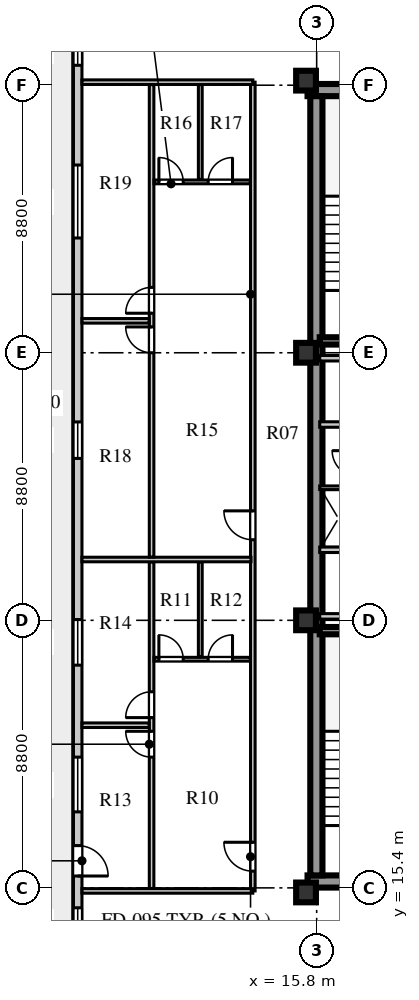
"""IFC4 building model, lengths in metres.
Left out: names, types, materials, properties, quantities, classifications, styles, units other than length and angle.
Written with IfcOpenShell. Run it as: python <this file> out.ifc"""

import sys

from ifc_helpers import new_model, si_unit, direction, frame, frame_2d, origin, origin_2d, place, context, subcontext, project, spatial, rectangle, extrude, element, fill, save


model = new_model("IFC4")
c1 = context("Model", 3, precision=1e-05, world=origin(), true_north=direction((0.0, 1.0)))
c2 = subcontext(c1, "Body", "Model", "MODEL_VIEW")
j1 = project(units=[si_unit("LENGTHUNIT", "METRE"), si_unit("PLANEANGLEUNIT", "RADIAN")], contexts=[c1])
p1 = place(None, origin())
s1 = spatial("IfcSite", under=j1, at=p1, CompositionType="ELEMENT")
p2 = place(p1, origin())
s2 = spatial("IfcBuilding", under=s1, at=p2, CompositionType="ELEMENT")
p3 = place(p2, frame((0.0, 0.0, 245.3)))
s3 = spatial("IfcBuildingStorey", under=s2, at=p3, CompositionType="ELEMENT", Elevation=245.3)
for number, where, z_axis, x_axis in (
    (1, (15.5, 15.61, 0.0), (0.0, 0.0, 1.0), (1.0, 0.0, 0.0)),
    (2, (15.5, 41.64, 0.0), (0.0, 0.0, 1.0), (1.0, 0.0, 0.0)),
):
    element("IfcWall", number, at=place(p3, frame(where, z_axis=z_axis, x_axis=x_axis)), inside=s3, PredefinedType="SHEAR", context=c2, shape_type="SweptSolid", body=[
        extrude(rectangle(XDim=9.48, YDim=0.4, at=frame_2d((4.74, 0.0))), origin(), (0.0, 0.0, 1.0), 3.66),
    ])
p4 = place(p3, frame((15.79, 15.81, 0.0), z_axis=(0.0, 0.0, 1.0), x_axis=(0.0, 1.0, 0.0)))
e3 = element("IfcWall", 3, at=p4, inside=s3, PredefinedType="SHEAR", context=c2, shape_type="SweptSolid", body=[
    extrude(rectangle(XDim=25.63, YDim=0.4, at=frame_2d((12.815, 0.0))), origin(), (0.0, 0.0, 1.0), 3.66),
])
for number, where, z_axis, x_axis in (
    (4, (15.45, 15.25, 0.0), (0.0, 0.0, 1.0), (1.0, 0.0, 0.0)),
    (5, (15.45, 24.2, 0.0), (0.0, 0.0, 1.0), (1.0, 0.0, 0.0)),
    (6, (15.45, 33.0, 0.0), (0.0, 0.0, 1.0), (1.0, 0.0, 0.0)),
    (7, (15.45, 41.95, 0.0), (0.0, 0.0, 1.0), (1.0, 0.0, 0.0)),
):
    element("IfcColumn", number, at=place(p3, frame(where, z_axis=z_axis, x_axis=x_axis)), inside=s3, PredefinedType="COLUMN", context=c2, shape_type="SweptSolid", body=[
        extrude(rectangle(XDim=0.65, YDim=0.65, at=origin_2d()), origin(), (0.0, 0.0, 1.0), 3.66),
    ])
p5 = place(p3, frame((7.94, 44.07, 0.0), z_axis=(0.0, 0.0, 1.0), x_axis=(0.0, -1.0, 0.0)))
e8 = element("IfcWall", 8, at=p5, inside=s3, PredefinedType="STANDARD", context=c2, shape_type="SweptSolid", body=[
    extrude(rectangle(XDim=30.94, YDim=0.28, at=frame_2d((15.47, 0.0))), origin(), (0.0, 0.0, 1.0), 3.66),
])
p6 = place(p5, frame((29.325, 0.0, 0.8)))
e9 = element("IfcOpeningElement", 9, at=p6, cuts=e8, PredefinedType="OPENING", context=c2, shape_type="SweptSolid", body=[
    extrude(rectangle(XDim=0.95, YDim=1.65, at=frame_2d((0.475, 0.825))), frame((0.0, 0.15, 0.0), z_axis=(0.0, -1.0, 0.0), x_axis=(1.0, 0.0, 0.0)), (0.0, 0.0, 1.0), 0.3),
])
p7 = place(p5, frame((27.28, 0.0, 0.0)))
e10 = element("IfcOpeningElement", 10, at=p7, cuts=e8, PredefinedType="OPENING", context=c2, shape_type="SweptSolid", body=[
    extrude(rectangle(XDim=1.0, YDim=2.05, at=frame_2d((0.5, 1.025))), frame((0.0, 0.15, 0.0), z_axis=(0.0, -1.0, 0.0), x_axis=(1.0, 0.0, 0.0)), (0.0, 0.0, 1.0), 0.3),
])
p8 = place(p5, frame((24.37, 0.0, 0.8)))
e11 = element("IfcOpeningElement", 11, at=p8, cuts=e8, PredefinedType="OPENING", context=c2, shape_type="SweptSolid", body=[
    extrude(rectangle(XDim=1.8, YDim=2.0, at=frame_2d((0.9, 1.0))), frame((0.0, 0.15, 0.0), z_axis=(0.0, -1.0, 0.0), x_axis=(1.0, 0.0, 0.0)), (0.0, 0.0, 1.0), 0.3),
])
p9 = place(p5, frame((19.845, 0.0, 0.8)))
e12 = element("IfcOpeningElement", 12, at=p9, cuts=e8, PredefinedType="OPENING", context=c2, shape_type="SweptSolid", body=[
    extrude(rectangle(XDim=1.5, YDim=2.0, at=frame_2d((0.75, 1.0))), frame((0.0, 0.15, 0.0), z_axis=(0.0, -1.0, 0.0), x_axis=(1.0, 0.0, 0.0)), (0.0, 0.0, 1.0), 0.3),
])
p10 = place(p5, frame((13.345, 0.0, 0.8)))
e13 = element("IfcOpeningElement", 13, at=p10, cuts=e8, PredefinedType="OPENING", context=c2, shape_type="SweptSolid", body=[
    extrude(rectangle(XDim=1.2, YDim=1.75, at=frame_2d((0.6, 0.875))), frame((0.0, 0.15, 0.0), z_axis=(0.0, -1.0, 0.0), x_axis=(1.0, 0.0, 0.0)), (0.0, 0.0, 1.0), 0.3),
])
p11 = place(p5, frame((4.895, 0.0, 0.8)))
e14 = element("IfcOpeningElement", 14, at=p11, cuts=e8, PredefinedType="OPENING", context=c2, shape_type="SweptSolid", body=[
    extrude(rectangle(XDim=2.4, YDim=2.05, at=frame_2d((1.2, 1.025))), frame((0.0, 0.15, 0.0), z_axis=(0.0, -1.0, 0.0), x_axis=(1.0, 0.0, 0.0)), (0.0, 0.0, 1.0), 0.3),
])
p12 = place(p5, frame((0.665, 0.0, 0.8)))
e15 = element("IfcOpeningElement", 15, at=p12, cuts=e8, PredefinedType="OPENING", context=c2, shape_type="SweptSolid", body=[
    extrude(rectangle(XDim=0.95, YDim=1.65, at=frame_2d((0.475, 0.825))), frame((0.0, 0.15, 0.0), z_axis=(0.0, -1.0, 0.0), x_axis=(1.0, 0.0, 0.0)), (0.0, 0.0, 1.0), 0.3),
])
p13 = place(p3, frame((15.9, 23.86, 0.0), z_axis=(0.0, 0.0, 1.0), x_axis=(1.0, 0.0, 0.0)))
e16 = element("IfcWall", 16, at=p13, inside=s3, PredefinedType="SHEAR", context=c2, shape_type="SweptSolid", body=[
    extrude(rectangle(XDim=3.52, YDim=0.24, at=frame_2d((1.76, 0.0))), origin(), (0.0, 0.0, 1.0), 3.9),
])
p14 = place(p3, frame((15.9, 26.52, 0.0), z_axis=(0.0, 0.0, 1.0), x_axis=(1.0, 0.0, 0.0)))
e17 = element("IfcWall", 17, at=p14, inside=s3, PredefinedType="SOLIDWALL", context=c2, shape_type="SweptSolid", body=[
    extrude(rectangle(XDim=8.68, YDim=0.18, at=frame_2d((4.34, 0.0))), origin(), (0.0, 0.0, 1.0), 3.66),
])
p15 = place(p14, frame((3.3, 0.0, 0.0)))
e18 = element("IfcOpeningElement", 18, at=p15, cuts=e17, PredefinedType="OPENING", context=c2, shape_type="SweptSolid", body=[
    extrude(rectangle(XDim=0.95, YDim=2.1, at=frame_2d((0.475, 1.05))), frame((0.0, 0.1, 0.0), z_axis=(0.0, -1.0, 0.0), x_axis=(1.0, 0.0, 0.0)), (0.0, 0.0, 1.0), 0.2),
])
p16 = place(p3, frame((15.9, 24.33, 0.0), z_axis=(0.0, 0.0, 1.0), x_axis=(1.0, 0.0, 0.0)))
e19 = element("IfcWall", 19, at=p16, inside=s3, PredefinedType="SOLIDWALL", context=c2, shape_type="SweptSolid", body=[
    extrude(rectangle(XDim=8.68, YDim=0.18, at=frame_2d((4.34, 0.0))), origin(), (0.0, 0.0, 1.0), 3.06),
])
p17 = place(p3, frame((15.9, 28.56, 0.0), z_axis=(0.0, 0.0, 1.0), x_axis=(1.0, 0.0, 0.0)))
e20 = element("IfcWall", 20, at=p17, inside=s3, PredefinedType="PARTITIONING", context=c2, shape_type="SweptSolid", body=[
    extrude(rectangle(XDim=1.2, YDim=0.12, at=frame_2d((0.6, 0.0))), origin(), (0.0, 0.0, 1.0), 3.66),
])
p18 = place(p3, frame((15.9, 30.64, 0.0), z_axis=(0.0, 0.0, 1.0), x_axis=(1.0, 0.0, 0.0)))
e21 = element("IfcWall", 21, at=p18, inside=s3, PredefinedType="SOLIDWALL", context=c2, shape_type="SweptSolid", body=[
    extrude(rectangle(XDim=8.68, YDim=0.18, at=frame_2d((4.34, 0.0))), origin(), (0.0, 0.0, 1.0), 3.66),
])
p19 = place(p18, frame((3.7, 0.0, 0.0)))
e22 = element("IfcOpeningElement", 22, at=p19, cuts=e21, PredefinedType="OPENING", context=c2, shape_type="SweptSolid", body=[
    extrude(rectangle(XDim=0.95, YDim=2.1, at=frame_2d((0.475, 1.05))), frame((0.0, 0.1, 0.0), z_axis=(0.0, -1.0, 0.0), x_axis=(1.0, 0.0, 0.0)), (0.0, 0.0, 1.0), 0.2),
])
p20 = place(p3, frame((15.9, 32.82, 0.0), z_axis=(0.0, 0.0, 1.0), x_axis=(1.0, 0.0, 0.0)))
e23 = element("IfcWall", 23, at=p20, inside=s3, PredefinedType="SOLIDWALL", context=c2, shape_type="SweptSolid", body=[
    extrude(rectangle(XDim=8.68, YDim=0.18, at=frame_2d((4.34, 0.0))), origin(), (0.0, 0.0, 1.0), 3.06),
])
p21 = place(p3, frame((15.9, 33.39, 0.0), z_axis=(0.0, 0.0, 1.0), x_axis=(1.0, 0.0, 0.0)))
e24 = element("IfcWall", 24, at=p21, inside=s3, PredefinedType="SHEAR", context=c2, shape_type="SweptSolid", body=[
    extrude(rectangle(XDim=3.52, YDim=0.24, at=frame_2d((1.76, 0.0))), origin(), (0.0, 0.0, 1.0), 3.9),
])
p22 = place(p3, frame((13.7, 15.3, 0.0), z_axis=(0.0, 0.0, 1.0), x_axis=(0.0, 1.0, 0.0)))
e25 = element("IfcWall", 25, at=p22, inside=s3, PredefinedType="PARTITIONING", context=c2, shape_type="SweptSolid", body=[
    extrude(rectangle(XDim=26.6, YDim=0.15, at=frame_2d((13.3, 0.0))), origin(), (0.0, 0.0, 1.0), 3.66),
])
p23 = place(p22, frame((0.65, 0.0, 0.0)))
e26 = element("IfcOpeningElement", 26, at=p23, cuts=e25, PredefinedType="OPENING", context=c2, shape_type="SweptSolid", body=[
    extrude(rectangle(XDim=0.95, YDim=2.1, at=frame_2d((0.475, 1.05))), frame((0.0, 0.085, 0.0), z_axis=(0.0, -1.0, 0.0), x_axis=(1.0, 0.0, 0.0)), (0.0, 0.0, 1.0), 0.17),
])
p24 = place(p22, frame((11.55, 0.0, 0.0)))
e27 = element("IfcOpeningElement", 27, at=p24, cuts=e25, PredefinedType="OPENING", context=c2, shape_type="SweptSolid", body=[
    extrude(rectangle(XDim=0.95, YDim=2.1, at=frame_2d((0.475, 1.05))), frame((0.0, 0.085, 0.0), z_axis=(0.0, -1.0, 0.0), x_axis=(1.0, 0.0, 0.0)), (0.0, 0.0, 1.0), 0.17),
])
for number, where, z_axis, x_axis in (
    (28, (8.08, 15.3, 0.0), (0.0, 0.0, 1.0), (1.0, 0.0, 0.0)),
    (29, (8.08, 41.9, 0.0), (0.0, 0.0, 1.0), (1.0, 0.0, 0.0)),
):
    element("IfcWall", number, at=place(p3, frame(where, z_axis=z_axis, x_axis=x_axis)), inside=s3, PredefinedType="PARTITIONING", context=c2, shape_type="SweptSolid", body=[
        extrude(rectangle(XDim=5.62, YDim=0.15, at=frame_2d((2.81, 0.0))), origin(), (0.0, 0.0, 1.0), 3.21),
    ])
p25 = place(p3, frame((10.37, 15.38, 0.0), z_axis=(0.0, 0.0, 1.0), x_axis=(0.0, 1.0, 0.0)))
e30 = element("IfcWall", 30, at=p25, inside=s3, PredefinedType="PARTITIONING", context=c2, shape_type="SweptSolid", body=[
    extrude(rectangle(XDim=10.74, YDim=0.15, at=frame_2d((5.37, 0.0))), origin(), (0.0, 0.0, 1.0), 3.66),
])
p26 = place(p25, frame((4.32, 0.0, 0.0)))
e31 = element("IfcOpeningElement", 31, at=p26, cuts=e30, PredefinedType="OPENING", context=c2, shape_type="SweptSolid", body=[
    extrude(rectangle(XDim=0.85, YDim=2.08, at=frame_2d((0.425, 1.04))), frame((0.0, 0.085, 0.0), z_axis=(0.0, -1.0, 0.0), x_axis=(1.0, 0.0, 0.0)), (0.0, 0.0, 1.0), 0.17),
])
p27 = place(p25, frame((5.62, 0.0, 0.0)))
e32 = element("IfcOpeningElement", 32, at=p27, cuts=e30, PredefinedType="OPENING", context=c2, shape_type="SweptSolid", body=[
    extrude(rectangle(XDim=0.85, YDim=2.08, at=frame_2d((0.425, 1.04))), frame((0.0, 0.085, 0.0), z_axis=(0.0, -1.0, 0.0), x_axis=(1.0, 0.0, 0.0)), (0.0, 0.0, 1.0), 0.17),
])
p28 = place(p3, frame((10.45, 22.92, 0.0), z_axis=(0.0, 0.0, 1.0), x_axis=(1.0, 0.0, 0.0)))
e33 = element("IfcWall", 33, at=p28, inside=s3, PredefinedType="PLUMBINGWALL", context=c2, shape_type="SweptSolid", body=[
    extrude(rectangle(XDim=3.17, YDim=0.125, at=frame_2d((1.585, 0.0))), origin(), (0.0, 0.0, 1.0), 3.66),
])
p29 = place(p28, frame((0.16, 0.0, 0.0)))
e34 = element("IfcOpeningElement", 34, at=p29, cuts=e33, PredefinedType="OPENING", context=c2, shape_type="SweptSolid", body=[
    extrude(rectangle(XDim=0.8, YDim=2.05, at=frame_2d((0.4, 1.025))), frame((0.0, 0.073, 0.0), z_axis=(0.0, -1.0, 0.0), x_axis=(1.0, 0.0, 0.0)), (0.0, 0.0, 1.0), 0.145),
])
p30 = place(p28, frame((1.782, 0.0, 0.0)))
e35 = element("IfcOpeningElement", 35, at=p30, cuts=e33, PredefinedType="OPENING", context=c2, shape_type="SweptSolid", body=[
    extrude(rectangle(XDim=0.8, YDim=2.05, at=frame_2d((0.4, 1.025))), frame((0.0, 0.073, 0.0), z_axis=(0.0, -1.0, 0.0), x_axis=(1.0, 0.0, 0.0)), (0.0, 0.0, 1.0), 0.145),
])
p31 = place(p3, frame((11.972, 23.0, 0.0), z_axis=(0.0, 0.0, 1.0), x_axis=(0.0, 1.0, 0.0)))
e36 = element("IfcWall", 36, at=p31, inside=s3, PredefinedType="PLUMBINGWALL", context=c2, shape_type="SweptSolid", body=[
    extrude(rectangle(XDim=3.12, YDim=0.125, at=frame_2d((1.56, 0.0))), origin(), (0.0, 0.0, 1.0), 3.66),
])
p32 = place(p3, frame((8.08, 20.75, 0.0), z_axis=(0.0, 0.0, 1.0), x_axis=(1.0, 0.0, 0.0)))
e37 = element("IfcWall", 37, at=p32, inside=s3, PredefinedType="PARTITIONING", context=c2, shape_type="SweptSolid", body=[
    extrude(rectangle(XDim=2.21, YDim=0.15, at=frame_2d((1.105, 0.0))), origin(), (0.0, 0.0, 1.0), 3.66),
])
p33 = place(p3, frame((8.08, 26.2, 0.0), z_axis=(0.0, 0.0, 1.0), x_axis=(1.0, 0.0, 0.0)))
e38 = element("IfcWall", 38, at=p33, inside=s3, PredefinedType="PARTITIONING", context=c2, shape_type="SweptSolid", body=[
    extrude(rectangle(XDim=5.56, YDim=0.15, at=frame_2d((2.78, 0.0))), origin(), (0.0, 0.0, 1.0), 3.66),
])
p34 = place(p3, frame((10.37, 26.28, 0.0), z_axis=(0.0, 0.0, 1.0), x_axis=(0.0, 1.0, 0.0)))
e39 = element("IfcWall", 39, at=p34, inside=s3, PredefinedType="PARTITIONING", context=c2, shape_type="SweptSolid", body=[
    extrude(rectangle(XDim=15.54, YDim=0.15, at=frame_2d((7.77, 0.0))), origin(), (0.0, 0.0, 1.0), 3.66),
])
p35 = place(p34, frame((6.72, 0.0, 0.0)))
e40 = element("IfcOpeningElement", 40, at=p35, cuts=e39, PredefinedType="OPENING", context=c2, shape_type="SweptSolid", body=[
    extrude(rectangle(XDim=0.85, YDim=2.08, at=frame_2d((0.425, 1.04))), frame((0.0, 0.085, 0.0), z_axis=(0.0, -1.0, 0.0), x_axis=(1.0, 0.0, 0.0)), (0.0, 0.0, 1.0), 0.17),
])
p36 = place(p34, frame((8.02, 0.0, 0.0)))
e41 = element("IfcOpeningElement", 41, at=p36, cuts=e39, PredefinedType="OPENING", context=c2, shape_type="SweptSolid", body=[
    extrude(rectangle(XDim=0.85, YDim=2.08, at=frame_2d((0.425, 1.04))), frame((0.0, 0.085, 0.0), z_axis=(0.0, -1.0, 0.0), x_axis=(1.0, 0.0, 0.0)), (0.0, 0.0, 1.0), 0.17),
])
p37 = place(p3, frame((10.45, 38.62, 0.0), z_axis=(0.0, 0.0, 1.0), x_axis=(1.0, 0.0, 0.0)))
e42 = element("IfcWall", 42, at=p37, inside=s3, PredefinedType="PLUMBINGWALL", context=c2, shape_type="SweptSolid", body=[
    extrude(rectangle(XDim=3.17, YDim=0.125, at=frame_2d((1.585, 0.0))), origin(), (0.0, 0.0, 1.0), 3.66),
])
p38 = place(p37, frame((0.16, 0.0, 0.0)))
e43 = element("IfcOpeningElement", 43, at=p38, cuts=e42, PredefinedType="OPENING", context=c2, shape_type="SweptSolid", body=[
    extrude(rectangle(XDim=0.8, YDim=2.05, at=frame_2d((0.4, 1.025))), frame((0.0, 0.073, 0.0), z_axis=(0.0, -1.0, 0.0), x_axis=(1.0, 0.0, 0.0)), (0.0, 0.0, 1.0), 0.145),
])
p39 = place(p37, frame((1.782, 0.0, 0.0)))
e44 = element("IfcOpeningElement", 44, at=p39, cuts=e42, PredefinedType="OPENING", context=c2, shape_type="SweptSolid", body=[
    extrude(rectangle(XDim=0.8, YDim=2.05, at=frame_2d((0.4, 1.025))), frame((0.0, 0.073, 0.0), z_axis=(0.0, -1.0, 0.0), x_axis=(1.0, 0.0, 0.0)), (0.0, 0.0, 1.0), 0.145),
])
p40 = place(p3, frame((11.972, 38.7, 0.0), z_axis=(0.0, 0.0, 1.0), x_axis=(0.0, 1.0, 0.0)))
e45 = element("IfcWall", 45, at=p40, inside=s3, PredefinedType="PLUMBINGWALL", context=c2, shape_type="SweptSolid", body=[
    extrude(rectangle(XDim=3.12, YDim=0.125, at=frame_2d((1.56, 0.0))), origin(), (0.0, 0.0, 1.0), 3.66),
])
p41 = place(p3, frame((8.08, 34.05, 0.0), z_axis=(0.0, 0.0, 1.0), x_axis=(1.0, 0.0, 0.0)))
e46 = element("IfcWall", 46, at=p41, inside=s3, PredefinedType="PARTITIONING", context=c2, shape_type="SweptSolid", body=[
    extrude(rectangle(XDim=2.21, YDim=0.15, at=frame_2d((1.105, 0.0))), origin(), (0.0, 0.0, 1.0), 3.66),
])
p42 = place(p6, origin())
e47 = element("IfcWindow", 47, at=p42, inside=s3, PartitioningType="SINGLE_PANEL", PredefinedType="WINDOW", context=c2, shape_type="SweptSolid", body=[
    extrude(rectangle(XDim=0.95, YDim=1.65, at=frame_2d((0.475, 0.825))), frame((0.0, 0.03, 0.0), z_axis=(0.0, -1.0, 0.0), x_axis=(1.0, 0.0, 0.0)), (0.0, 0.0, 1.0), 0.06),
])
fill(e9, e47)
p43 = place(p7, frame((1.0, 0.0, 0.0), z_axis=(0.0, 0.0, 1.0), x_axis=(-1.0, 0.0, 0.0)))
e48 = element("IfcDoor", 48, at=p43, inside=s3, OperationType="SINGLE_SWING_LEFT", PredefinedType="DOOR", context=c2, shape_type="SweptSolid", body=[
    extrude(rectangle(XDim=1.0, YDim=2.05, at=frame_2d((0.5, 1.025))), frame((0.0, 0.025, 0.0), z_axis=(0.0, -1.0, 0.0), x_axis=(1.0, 0.0, 0.0)), (0.0, 0.0, 1.0), 0.05),
])
fill(e10, e48)
p44 = place(p8, origin())
e49 = element("IfcWindow", 49, at=p44, inside=s3, PartitioningType="SINGLE_PANEL", PredefinedType="WINDOW", context=c2, shape_type="SweptSolid", body=[
    extrude(rectangle(XDim=1.8, YDim=2.0, at=frame_2d((0.9, 1.0))), frame((0.0, 0.03, 0.0), z_axis=(0.0, -1.0, 0.0), x_axis=(1.0, 0.0, 0.0)), (0.0, 0.0, 1.0), 0.06),
])
fill(e11, e49)
p45 = place(p9, origin())
e50 = element("IfcWindow", 50, at=p45, inside=s3, PartitioningType="SINGLE_PANEL", PredefinedType="WINDOW", context=c2, shape_type="SweptSolid", body=[
    extrude(rectangle(XDim=1.5, YDim=2.0, at=frame_2d((0.75, 1.0))), frame((0.0, 0.03, 0.0), z_axis=(0.0, -1.0, 0.0), x_axis=(1.0, 0.0, 0.0)), (0.0, 0.0, 1.0), 0.06),
])
fill(e12, e50)
p46 = place(p10, origin())
e51 = element("IfcWindow", 51, at=p46, inside=s3, PartitioningType="SINGLE_PANEL", PredefinedType="WINDOW", context=c2, shape_type="SweptSolid", body=[
    extrude(rectangle(XDim=1.2, YDim=1.75, at=frame_2d((0.6, 0.875))), frame((0.0, 0.03, 0.0), z_axis=(0.0, -1.0, 0.0), x_axis=(1.0, 0.0, 0.0)), (0.0, 0.0, 1.0), 0.06),
])
fill(e13, e51)
p47 = place(p11, origin())
e52 = element("IfcWindow", 52, at=p47, inside=s3, PartitioningType="SINGLE_PANEL", PredefinedType="WINDOW", context=c2, shape_type="SweptSolid", body=[
    extrude(rectangle(XDim=2.4, YDim=2.05, at=frame_2d((1.2, 1.025))), frame((0.0, 0.03, 0.0), z_axis=(0.0, -1.0, 0.0), x_axis=(1.0, 0.0, 0.0)), (0.0, 0.0, 1.0), 0.06),
])
fill(e14, e52)
p48 = place(p12, origin())
e53 = element("IfcWindow", 53, at=p48, inside=s3, PartitioningType="SINGLE_PANEL", PredefinedType="WINDOW", context=c2, shape_type="SweptSolid", body=[
    extrude(rectangle(XDim=0.95, YDim=1.65, at=frame_2d((0.475, 0.825))), frame((0.0, 0.03, 0.0), z_axis=(0.0, -1.0, 0.0), x_axis=(1.0, 0.0, 0.0)), (0.0, 0.0, 1.0), 0.06),
])
fill(e15, e53)
p49 = place(p29, origin())
e54 = element("IfcDoor", 54, at=p49, inside=s3, OperationType="SINGLE_SWING_LEFT", PredefinedType="DOOR", context=c2, shape_type="SweptSolid", body=[
    extrude(rectangle(XDim=0.8, YDim=2.05, at=frame_2d((0.4, 1.025))), frame((0.0, 0.025, 0.0), z_axis=(0.0, -1.0, 0.0), x_axis=(1.0, 0.0, 0.0)), (0.0, 0.0, 1.0), 0.05),
])
fill(e34, e54)
p50 = place(p30, origin())
e55 = element("IfcDoor", 55, at=p50, inside=s3, OperationType="SINGLE_SWING_RIGHT", PredefinedType="DOOR", context=c2, shape_type="SweptSolid", body=[
    extrude(rectangle(XDim=0.8, YDim=2.05, at=frame_2d((0.4, 1.025))), frame((0.0, 0.025, 0.0), z_axis=(0.0, -1.0, 0.0), x_axis=(1.0, 0.0, 0.0)), (0.0, 0.0, 1.0), 0.05),
])
fill(e35, e55)
p51 = place(p26, frame((0.85, 0.0, 0.0), z_axis=(0.0, 0.0, 1.0), x_axis=(-1.0, 0.0, 0.0)))
e56 = element("IfcDoor", 56, at=p51, inside=s3, OperationType="SINGLE_SWING_LEFT", PredefinedType="DOOR", context=c2, shape_type="SweptSolid", body=[
    extrude(rectangle(XDim=0.85, YDim=2.08, at=frame_2d((0.425, 1.04))), frame((0.0, 0.025, 0.0), z_axis=(0.0, -1.0, 0.0), x_axis=(1.0, 0.0, 0.0)), (0.0, 0.0, 1.0), 0.05),
])
fill(e31, e56)
p52 = place(p27, frame((0.85, 0.0, 0.0), z_axis=(0.0, 0.0, 1.0), x_axis=(-1.0, 0.0, 0.0)))
e57 = element("IfcDoor", 57, at=p52, inside=s3, OperationType="SINGLE_SWING_RIGHT", PredefinedType="DOOR", context=c2, shape_type="SweptSolid", body=[
    extrude(rectangle(XDim=0.85, YDim=2.08, at=frame_2d((0.425, 1.04))), frame((0.0, 0.025, 0.0), z_axis=(0.0, -1.0, 0.0), x_axis=(1.0, 0.0, 0.0)), (0.0, 0.0, 1.0), 0.05),
])
fill(e32, e57)
p53 = place(p23, frame((0.95, 0.0, 0.0), z_axis=(0.0, 0.0, 1.0), x_axis=(-1.0, 0.0, 0.0)))
e58 = element("IfcDoor", 58, at=p53, inside=s3, OperationType="SINGLE_SWING_LEFT", PredefinedType="DOOR", context=c2, shape_type="SweptSolid", body=[
    extrude(rectangle(XDim=0.95, YDim=2.1, at=frame_2d((0.475, 1.05))), frame((0.0, 0.025, 0.0), z_axis=(0.0, -1.0, 0.0), x_axis=(1.0, 0.0, 0.0)), (0.0, 0.0, 1.0), 0.05),
])
fill(e26, e58)
p54 = place(p38, origin())
e59 = element("IfcDoor", 59, at=p54, inside=s3, OperationType="SINGLE_SWING_LEFT", PredefinedType="DOOR", context=c2, shape_type="SweptSolid", body=[
    extrude(rectangle(XDim=0.8, YDim=2.05, at=frame_2d((0.4, 1.025))), frame((0.0, 0.025, 0.0), z_axis=(0.0, -1.0, 0.0), x_axis=(1.0, 0.0, 0.0)), (0.0, 0.0, 1.0), 0.05),
])
fill(e43, e59)
p55 = place(p39, origin())
e60 = element("IfcDoor", 60, at=p55, inside=s3, OperationType="SINGLE_SWING_RIGHT", PredefinedType="DOOR", context=c2, shape_type="SweptSolid", body=[
    extrude(rectangle(XDim=0.8, YDim=2.05, at=frame_2d((0.4, 1.025))), frame((0.0, 0.025, 0.0), z_axis=(0.0, -1.0, 0.0), x_axis=(1.0, 0.0, 0.0)), (0.0, 0.0, 1.0), 0.05),
])
fill(e44, e60)
p56 = place(p35, frame((0.85, 0.0, 0.0), z_axis=(0.0, 0.0, 1.0), x_axis=(-1.0, 0.0, 0.0)))
e61 = element("IfcDoor", 61, at=p56, inside=s3, OperationType="SINGLE_SWING_LEFT", PredefinedType="DOOR", context=c2, shape_type="SweptSolid", body=[
    extrude(rectangle(XDim=0.85, YDim=2.08, at=frame_2d((0.425, 1.04))), frame((0.0, 0.025, 0.0), z_axis=(0.0, -1.0, 0.0), x_axis=(1.0, 0.0, 0.0)), (0.0, 0.0, 1.0), 0.05),
])
fill(e40, e61)
p57 = place(p36, frame((0.85, 0.0, 0.0), z_axis=(0.0, 0.0, 1.0), x_axis=(-1.0, 0.0, 0.0)))
e62 = element("IfcDoor", 62, at=p57, inside=s3, OperationType="SINGLE_SWING_RIGHT", PredefinedType="DOOR", context=c2, shape_type="SweptSolid", body=[
    extrude(rectangle(XDim=0.85, YDim=2.08, at=frame_2d((0.425, 1.04))), frame((0.0, 0.025, 0.0), z_axis=(0.0, -1.0, 0.0), x_axis=(1.0, 0.0, 0.0)), (0.0, 0.0, 1.0), 0.05),
])
fill(e41, e62)
p58 = place(p24, frame((0.95, 0.0, 0.0), z_axis=(0.0, 0.0, 1.0), x_axis=(-1.0, 0.0, 0.0)))
e63 = element("IfcDoor", 63, at=p58, inside=s3, OperationType="SINGLE_SWING_LEFT", PredefinedType="DOOR", context=c2, shape_type="SweptSolid", body=[
    extrude(rectangle(XDim=0.95, YDim=2.1, at=frame_2d((0.475, 1.05))), frame((0.0, 0.025, 0.0), z_axis=(0.0, -1.0, 0.0), x_axis=(1.0, 0.0, 0.0)), (0.0, 0.0, 1.0), 0.05),
])
fill(e27, e63)
save(model, sys.argv[1])
